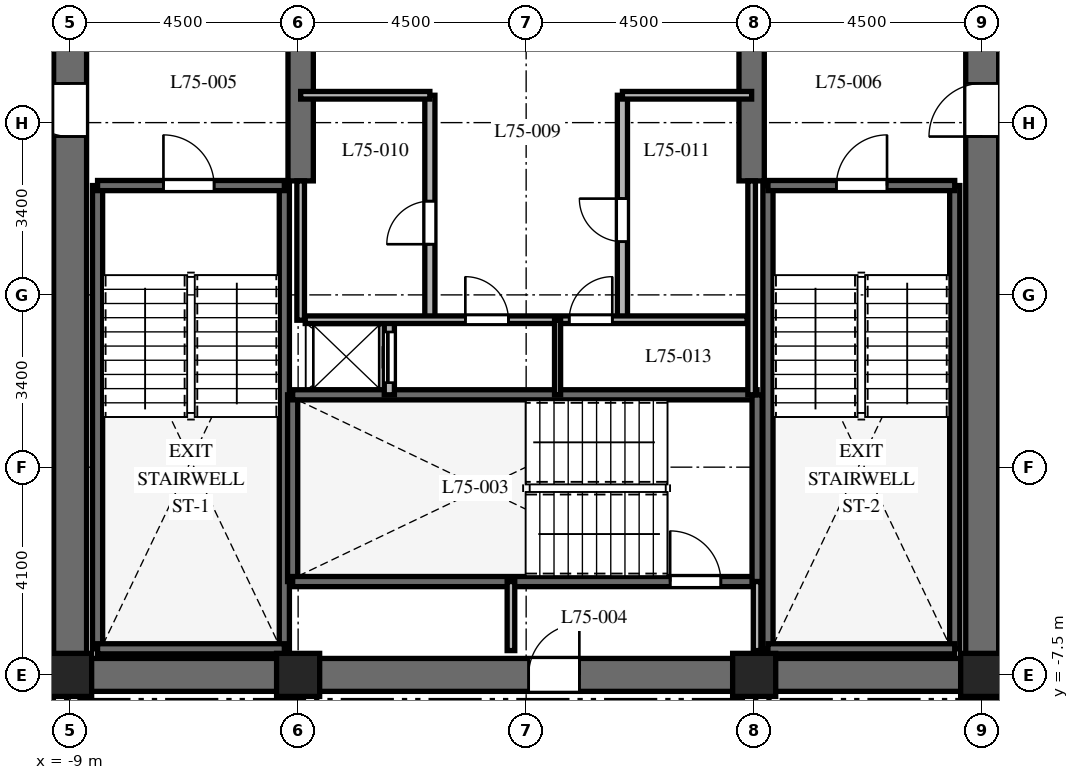
"""IFC4 building model, lengths in metres.
Left out: names, types, materials, properties, quantities, classifications, styles, units other than length and angle.
Written with IfcOpenShell. Run it as: python <this file> out.ifc"""

import sys

from ifc_helpers import new_model, si_unit, direction, frame, frame_2d, origin, origin_2d, place, context, subcontext, project, spatial, rectangle, extrude, element, fill, save


model = new_model("IFC4")
c1 = context("Model", 3, precision=1e-05, world=origin(), true_north=direction((0.0, 1.0)))
c2 = subcontext(c1, "Body", "Model", "MODEL_VIEW")
j1 = project(units=[si_unit("LENGTHUNIT", "METRE"), si_unit("PLANEANGLEUNIT", "RADIAN")], contexts=[c1])
p1 = place(None, origin())
s1 = spatial("IfcSite", under=j1, at=p1, CompositionType="ELEMENT")
p2 = place(p1, origin())
s2 = spatial("IfcBuilding", under=s1, at=p2, CompositionType="ELEMENT")
p3 = place(p2, frame((0.0, 0.0, 301.5)))
s3 = spatial("IfcBuildingStorey", under=s2, at=p3, CompositionType="ELEMENT", Elevation=301.5)
p4 = place(p3, frame((-9.325, -7.5, 0.0), z_axis=(0.0, 0.0, 1.0), x_axis=(1.0, 0.0, 0.0)))
e1 = element("IfcWall", 1, at=p4, inside=s3, PredefinedType="SHEAR", context=c2, shape_type="SweptSolid", body=[
    extrude(rectangle(XDim=18.65, YDim=0.65, at=frame_2d((9.325, 0.0))), origin(), (0.0, 0.0, 1.0), 3.9),
])
p5 = place(p4, frame((9.375, 0.0, 0.0)))
e2 = element("IfcOpeningElement", 2, at=p5, cuts=e1, PredefinedType="OPENING", context=c2, shape_type="SweptSolid", body=[
    extrude(rectangle(XDim=1.0, YDim=2.15, at=frame_2d((0.5, 1.075))), frame((0.0, 0.335, 0.0), z_axis=(0.0, -1.0, 0.0), x_axis=(1.0, 0.0, 0.0)), (0.0, 0.0, 1.0), 0.67),
])
p6 = place(p3, frame((-9.0, -7.175, 0.0), z_axis=(0.0, 0.0, 1.0), x_axis=(0.0, 1.0, 0.0)))
e3 = element("IfcWall", 3, at=p6, inside=s3, PredefinedType="SHEAR", context=c2, shape_type="SweptSolid", body=[
    extrude(rectangle(XDim=14.35, YDim=0.65, at=frame_2d((7.175, 0.0))), origin(), (0.0, 0.0, 1.0), 3.9),
])
p7 = place(p6, frame((10.3, 0.0, 0.0)))
e4 = element("IfcOpeningElement", 4, at=p7, cuts=e3, PredefinedType="OPENING", context=c2, shape_type="SweptSolid", body=[
    extrude(rectangle(XDim=1.05, YDim=2.15, at=frame_2d((0.525, 1.075))), frame((0.0, 0.335, 0.0), z_axis=(0.0, -1.0, 0.0), x_axis=(1.0, 0.0, 0.0)), (0.0, 0.0, 1.0), 0.67),
])
p8 = place(p3, frame((9.0, -7.175, 0.0), z_axis=(0.0, 0.0, 1.0), x_axis=(0.0, 1.0, 0.0)))
e5 = element("IfcWall", 5, at=p8, inside=s3, PredefinedType="SHEAR", context=c2, shape_type="SweptSolid", body=[
    extrude(rectangle(XDim=14.35, YDim=0.65, at=frame_2d((7.175, 0.0))), origin(), (0.0, 0.0, 1.0), 3.9),
])
p9 = place(p8, frame((10.3, 0.0, 0.0)))
e6 = element("IfcOpeningElement", 6, at=p9, cuts=e5, PredefinedType="OPENING", context=c2, shape_type="SweptSolid", body=[
    extrude(rectangle(XDim=1.05, YDim=2.15, at=frame_2d((0.525, 1.075))), frame((0.0, 0.335, 0.0), z_axis=(0.0, -1.0, 0.0), x_axis=(1.0, 0.0, 0.0)), (0.0, 0.0, 1.0), 0.67),
])
for number, where, z_axis, x_axis in (
    (7, (-4.45, 2.25, 0.0), (0.0, 0.0, 1.0), (0.0, 1.0, 0.0)),
    (8, (4.45, 2.25, 0.0), (0.0, 0.0, 1.0), (0.0, 1.0, 0.0)),
):
    element("IfcWall", number, at=place(p3, frame(where, z_axis=z_axis, x_axis=x_axis)), inside=s3, PredefinedType="SHEAR", context=c2, shape_type="SweptSolid", body=[
        extrude(rectangle(XDim=4.925, YDim=0.5, at=frame_2d((2.462, 0.0))), origin(), (0.0, 0.0, 1.0), 3.9),
    ])
for number, where, z_axis, x_axis in (
    (9, (-8.458, -6.985, 0.0), (0.0, 0.0, 1.0), (0.0, 1.0, 0.0)),
    (10, (-4.772, -6.985, 0.0), (0.0, 0.0, 1.0), (0.0, 1.0, 0.0)),
):
    element("IfcWall", number, at=place(p3, frame(where, z_axis=z_axis, x_axis=x_axis)), inside=s3, PredefinedType="SHEAR", context=c2, shape_type="SweptSolid", body=[
        extrude(rectangle(XDim=9.143, YDim=0.2, at=frame_2d((4.572, 0.0))), origin(), (0.0, 0.0, 1.0), 3.9),
    ])
p10 = place(p3, frame((-8.458, -6.985, 0.0), z_axis=(0.0, 0.0, 1.0), x_axis=(1.0, 0.0, 0.0)))
e11 = element("IfcWall", 11, at=p10, inside=s3, PredefinedType="SHEAR", context=c2, shape_type="SweptSolid", body=[
    extrude(rectangle(XDim=3.686, YDim=0.2, at=frame_2d((1.843, 0.0))), origin(), (0.0, 0.0, 1.0), 3.9),
])
p11 = place(p3, frame((-8.458, 2.158, 0.0), z_axis=(0.0, 0.0, 1.0), x_axis=(1.0, 0.0, 0.0)))
e12 = element("IfcWall", 12, at=p11, inside=s3, PredefinedType="SHEAR", context=c2, shape_type="SweptSolid", body=[
    extrude(rectangle(XDim=3.686, YDim=0.2, at=frame_2d((1.843, 0.0))), origin(), (0.0, 0.0, 1.0), 3.9),
])
p12 = place(p11, frame((1.3, 0.0, 0.0)))
e13 = element("IfcOpeningElement", 13, at=p12, cuts=e12, PredefinedType="OPENING", context=c2, shape_type="SweptSolid", body=[
    extrude(rectangle(XDim=1.0, YDim=2.15, at=frame_2d((0.5, 1.075))), frame((0.0, 0.11, 0.0), z_axis=(0.0, -1.0, 0.0), x_axis=(1.0, 0.0, 0.0)), (0.0, 0.0, 1.0), 0.22),
])
for number, where, z_axis, x_axis in (
    (14, (4.772, -6.985, 0.0), (0.0, 0.0, 1.0), (0.0, 1.0, 0.0)),
    (15, (8.458, -6.985, 0.0), (0.0, 0.0, 1.0), (0.0, 1.0, 0.0)),
):
    element("IfcWall", number, at=place(p3, frame(where, z_axis=z_axis, x_axis=x_axis)), inside=s3, PredefinedType="SHEAR", context=c2, shape_type="SweptSolid", body=[
        extrude(rectangle(XDim=9.143, YDim=0.2, at=frame_2d((4.572, 0.0))), origin(), (0.0, 0.0, 1.0), 3.9),
    ])
p13 = place(p3, frame((4.772, -6.985, 0.0), z_axis=(0.0, 0.0, 1.0), x_axis=(1.0, 0.0, 0.0)))
e16 = element("IfcWall", 16, at=p13, inside=s3, PredefinedType="SHEAR", context=c2, shape_type="SweptSolid", body=[
    extrude(rectangle(XDim=3.686, YDim=0.2, at=frame_2d((1.843, 0.0))), origin(), (0.0, 0.0, 1.0), 3.9),
])
p14 = place(p3, frame((4.772, 2.158, 0.0), z_axis=(0.0, 0.0, 1.0), x_axis=(1.0, 0.0, 0.0)))
e17 = element("IfcWall", 17, at=p14, inside=s3, PredefinedType="SHEAR", context=c2, shape_type="SweptSolid", body=[
    extrude(rectangle(XDim=3.686, YDim=0.2, at=frame_2d((1.843, 0.0))), origin(), (0.0, 0.0, 1.0), 3.9),
])
p15 = place(p14, frame((1.35, 0.0, 0.0)))
e18 = element("IfcOpeningElement", 18, at=p15, cuts=e17, PredefinedType="OPENING", context=c2, shape_type="SweptSolid", body=[
    extrude(rectangle(XDim=1.0, YDim=2.15, at=frame_2d((0.5, 1.075))), frame((0.0, 0.11, 0.0), z_axis=(0.0, -1.0, 0.0), x_axis=(1.0, 0.0, 0.0)), (0.0, 0.0, 1.0), 0.22),
])
p16 = place(p3, frame((-4.608, -5.658, 0.0), z_axis=(0.0, 0.0, 1.0), x_axis=(0.0, 1.0, 0.0)))
e19 = element("IfcWall", 19, at=p16, inside=s3, PredefinedType="SHEAR", context=c2, shape_type="SweptSolid", body=[
    extrude(rectangle(XDim=3.686, YDim=0.2, at=frame_2d((1.843, 0.0))), origin(), (0.0, 0.0, 1.0), 3.9),
])
p17 = place(p3, frame((-4.608, -5.658, 0.0), z_axis=(0.0, 0.0, 1.0), x_axis=(1.0, 0.0, 0.0)))
e20 = element("IfcWall", 20, at=p17, inside=s3, PredefinedType="SHEAR", context=c2, shape_type="SweptSolid", body=[
    extrude(rectangle(XDim=9.166, YDim=0.2, at=frame_2d((4.583, 0.0))), origin(), (0.0, 0.0, 1.0), 3.9),
])
p18 = place(p17, frame((7.45, 0.0, 0.0)))
e21 = element("IfcOpeningElement", 21, at=p18, cuts=e20, PredefinedType="OPENING", context=c2, shape_type="SweptSolid", body=[
    extrude(rectangle(XDim=1.0, YDim=2.15, at=frame_2d((0.5, 1.075))), frame((0.0, 0.11, 0.0), z_axis=(0.0, -1.0, 0.0), x_axis=(1.0, 0.0, 0.0)), (0.0, 0.0, 1.0), 0.22),
])
p19 = place(p3, frame((-4.608, -1.972, 0.0), z_axis=(0.0, 0.0, 1.0), x_axis=(1.0, 0.0, 0.0)))
e22 = element("IfcWall", 22, at=p19, inside=s3, PredefinedType="SHEAR", context=c2, shape_type="SweptSolid", body=[
    extrude(rectangle(XDim=9.166, YDim=0.2, at=frame_2d((4.583, 0.0))), origin(), (0.0, 0.0, 1.0), 3.9),
])
p20 = place(p3, frame((4.558, -5.658, 0.0), z_axis=(0.0, 0.0, 1.0), x_axis=(0.0, 1.0, 0.0)))
e23 = element("IfcWall", 23, at=p20, inside=s3, PredefinedType="SHEAR", context=c2, shape_type="SweptSolid", body=[
    extrude(rectangle(XDim=3.686, YDim=0.2, at=frame_2d((1.843, 0.0))), origin(), (0.0, 0.0, 1.0), 3.9),
])
for number, where, z_axis, x_axis in (
    (24, (-9.0, -7.5, 0.0), (0.0, 0.0, 1.0), (1.0, 0.0, 0.0)),
    (25, (-4.5, -7.5, 0.0), (0.0, 0.0, 1.0), (1.0, 0.0, 0.0)),
    (26, (4.5, -7.5, 0.0), (0.0, 0.0, 1.0), (1.0, 0.0, 0.0)),
    (27, (9.0, -7.5, 0.0), (0.0, 0.0, 1.0), (1.0, 0.0, 0.0)),
):
    element("IfcColumn", number, at=place(p3, frame(where, z_axis=z_axis, x_axis=x_axis)), inside=s3, PredefinedType="COLUMN", context=c2, shape_type="SweptSolid", body=[
        extrude(rectangle(XDim=0.85, YDim=0.85, at=origin_2d()), origin(), (0.0, 0.0, 1.0), 3.9),
    ])
for number, where, z_axis, x_axis in (
    (28, (-0.3, -7.02, 0.0), (0.0, 0.0, 1.0), (0.0, 1.0, 0.0)),
    (29, (4.558, -7.02, 0.0), (0.0, 0.0, 1.0), (0.0, 1.0, 0.0)),
):
    element("IfcWall", number, at=place(p3, frame(where, z_axis=z_axis, x_axis=x_axis)), inside=s3, PredefinedType="PARTITIONING", context=c2, shape_type="SweptSolid", body=[
        extrude(rectangle(XDim=1.362, YDim=0.15, at=frame_2d((0.681, 0.0))), origin(), (0.0, 0.0, 1.0), 3.58),
    ])
p21 = place(p3, frame((-2.7, -1.972, 0.0), z_axis=(0.0, 0.0, 1.0), x_axis=(0.0, 1.0, 0.0)))
e30 = element("IfcWall", 30, at=p21, inside=s3, PredefinedType="PARTITIONING", context=c2, shape_type="SweptSolid", body=[
    extrude(rectangle(XDim=1.472, YDim=0.2, at=frame_2d((0.736, 0.0))), origin(), (0.0, 0.0, 1.0), 3.58),
])
p22 = place(p21, frame((0.24, 0.0, 0.0)))
e31 = element("IfcOpeningElement", 31, at=p22, cuts=e30, PredefinedType="OPENING", context=c2, shape_type="SweptSolid", body=[
    extrude(rectangle(XDim=1.0, YDim=2.2, at=frame_2d((0.5, 1.1))), frame((0.0, 0.11, 0.0), z_axis=(0.0, -1.0, 0.0), x_axis=(1.0, 0.0, 0.0)), (0.0, 0.0, 1.0), 0.22),
])
p23 = place(p3, frame((-4.45, -0.5, 0.0), z_axis=(0.0, 0.0, 1.0), x_axis=(0.0, 1.0, 0.0)))
e32 = element("IfcWall", 32, at=p23, inside=s3, PredefinedType="PARTITIONING", context=c2, shape_type="SweptSolid", body=[
    extrude(rectangle(XDim=2.75, YDim=0.15, at=frame_2d((1.375, 0.0))), origin(), (0.0, 0.0, 1.0), 3.58),
])
p24 = place(p3, frame((4.45, -1.972, 0.0), z_axis=(0.0, 0.0, 1.0), x_axis=(0.0, 1.0, 0.0)))
e33 = element("IfcWall", 33, at=p24, inside=s3, PredefinedType="PARTITIONING", context=c2, shape_type="SweptSolid", body=[
    extrude(rectangle(XDim=4.222, YDim=0.15, at=frame_2d((2.111, 0.0))), origin(), (0.0, 0.0, 1.0), 3.58),
])
p25 = place(p3, frame((-1.9, -0.5, 0.0), z_axis=(0.0, 0.0, 1.0), x_axis=(0.0, 1.0, 0.0)))
e34 = element("IfcWall", 34, at=p25, inside=s3, PredefinedType="PARTITIONING", context=c2, shape_type="SweptSolid", body=[
    extrude(rectangle(XDim=4.44, YDim=0.2, at=frame_2d((2.22, 0.0))), origin(), (0.0, 0.0, 1.0), 3.58),
])
p26 = place(p25, frame((1.5, 0.0, 0.0)))
e35 = element("IfcOpeningElement", 35, at=p26, cuts=e34, PredefinedType="OPENING", context=c2, shape_type="SweptSolid", body=[
    extrude(rectangle(XDim=0.85, YDim=2.03, at=frame_2d((0.425, 1.015))), frame((0.0, 0.11, 0.0), z_axis=(0.0, -1.0, 0.0), x_axis=(1.0, 0.0, 0.0)), (0.0, 0.0, 1.0), 0.22),
])
p27 = place(p3, frame((-4.45, 3.94, 0.0), z_axis=(0.0, 0.0, 1.0), x_axis=(1.0, 0.0, 0.0)))
e36 = element("IfcWall", 36, at=p27, inside=s3, PredefinedType="PARTITIONING", context=c2, shape_type="SweptSolid", body=[
    extrude(rectangle(XDim=2.55, YDim=0.15, at=frame_2d((1.275, 0.0))), origin(), (0.0, 0.0, 1.0), 3.58),
])
p28 = place(p3, frame((1.9, -0.5, 0.0), z_axis=(0.0, 0.0, 1.0), x_axis=(0.0, 1.0, 0.0)))
e37 = element("IfcWall", 37, at=p28, inside=s3, PredefinedType="PARTITIONING", context=c2, shape_type="SweptSolid", body=[
    extrude(rectangle(XDim=4.44, YDim=0.2, at=frame_2d((2.22, 0.0))), origin(), (0.0, 0.0, 1.0), 3.58),
])
p29 = place(p28, frame((1.55, 0.0, 0.0)))
e38 = element("IfcOpeningElement", 38, at=p29, cuts=e37, PredefinedType="OPENING", context=c2, shape_type="SweptSolid", body=[
    extrude(rectangle(XDim=0.85, YDim=2.03, at=frame_2d((0.425, 1.015))), frame((0.0, 0.11, 0.0), z_axis=(0.0, -1.0, 0.0), x_axis=(1.0, 0.0, 0.0)), (0.0, 0.0, 1.0), 0.22),
])
p30 = place(p3, frame((1.9, 3.94, 0.0), z_axis=(0.0, 0.0, 1.0), x_axis=(1.0, 0.0, 0.0)))
e39 = element("IfcWall", 39, at=p30, inside=s3, PredefinedType="PARTITIONING", context=c2, shape_type="SweptSolid", body=[
    extrude(rectangle(XDim=2.55, YDim=0.15, at=frame_2d((1.275, 0.0))), origin(), (0.0, 0.0, 1.0), 3.58),
])
p31 = place(p3, frame((-4.36, -0.49, 0.0), z_axis=(0.0, 0.0, 1.0), x_axis=(1.0, 0.0, 0.0)))
e40 = element("IfcWall", 40, at=p31, inside=s3, PredefinedType="PARTITIONING", context=c2, shape_type="SweptSolid", body=[
    extrude(rectangle(XDim=8.72, YDim=0.15, at=frame_2d((4.36, 0.0))), origin(), (0.0, 0.0, 1.0), 3.58),
])
p32 = place(p31, frame((3.16, 0.0, 0.0)))
e41 = element("IfcOpeningElement", 41, at=p32, cuts=e40, PredefinedType="OPENING", context=c2, shape_type="SweptSolid", body=[
    extrude(rectangle(XDim=0.85, YDim=2.03, at=frame_2d((0.425, 1.015))), frame((0.0, 0.085, 0.0), z_axis=(0.0, -1.0, 0.0), x_axis=(1.0, 0.0, 0.0)), (0.0, 0.0, 1.0), 0.17),
])
p33 = place(p31, frame((5.21, 0.0, 0.0)))
e42 = element("IfcOpeningElement", 42, at=p33, cuts=e40, PredefinedType="OPENING", context=c2, shape_type="SweptSolid", body=[
    extrude(rectangle(XDim=0.85, YDim=2.03, at=frame_2d((0.425, 1.015))), frame((0.0, 0.085, 0.0), z_axis=(0.0, -1.0, 0.0), x_axis=(1.0, 0.0, 0.0)), (0.0, 0.0, 1.0), 0.17),
])
p34 = place(p3, frame((0.62, -1.972, 0.0), z_axis=(0.0, 0.0, 1.0), x_axis=(0.0, 1.0, 0.0)))
e43 = element("IfcWall", 43, at=p34, inside=s3, PredefinedType="PARTITIONING", context=c2, shape_type="SweptSolid", body=[
    extrude(rectangle(XDim=1.472, YDim=0.12, at=frame_2d((0.736, 0.0))), origin(), (0.0, 0.0, 1.0), 3.58),
])
p35 = place(p12, origin())
e44 = element("IfcDoor", 44, at=p35, inside=s3, OperationType="SINGLE_SWING_LEFT", PredefinedType="DOOR", context=c2, shape_type="SweptSolid", body=[
    extrude(rectangle(XDim=1.0, YDim=2.15, at=frame_2d((0.5, 1.075))), frame((0.0, 0.025, 0.0), z_axis=(0.0, -1.0, 0.0), x_axis=(1.0, 0.0, 0.0)), (0.0, 0.0, 1.0), 0.05),
])
fill(e13, e44)
p36 = place(p15, origin())
e45 = element("IfcDoor", 45, at=p36, inside=s3, OperationType="SINGLE_SWING_RIGHT", PredefinedType="DOOR", context=c2, shape_type="SweptSolid", body=[
    extrude(rectangle(XDim=1.0, YDim=2.15, at=frame_2d((0.5, 1.075))), frame((0.0, 0.025, 0.0), z_axis=(0.0, -1.0, 0.0), x_axis=(1.0, 0.0, 0.0)), (0.0, 0.0, 1.0), 0.05),
])
fill(e18, e45)
p37 = place(p18, origin())
e46 = element("IfcDoor", 46, at=p37, inside=s3, OperationType="SINGLE_SWING_LEFT", PredefinedType="DOOR", context=c2, shape_type="SweptSolid", body=[
    extrude(rectangle(XDim=1.0, YDim=2.15, at=frame_2d((0.5, 1.075))), frame((0.0, 0.025, 0.0), z_axis=(0.0, -1.0, 0.0), x_axis=(1.0, 0.0, 0.0)), (0.0, 0.0, 1.0), 0.05),
])
fill(e21, e46)
p38 = place(p5, origin())
e47 = element("IfcDoor", 47, at=p38, inside=s3, OperationType="SINGLE_SWING_RIGHT", PredefinedType="DOOR", context=c2, shape_type="SweptSolid", body=[
    extrude(rectangle(XDim=1.0, YDim=2.15, at=frame_2d((0.5, 1.075))), frame((0.0, 0.025, 0.0), z_axis=(0.0, -1.0, 0.0), x_axis=(1.0, 0.0, 0.0)), (0.0, 0.0, 1.0), 0.05),
])
fill(e2, e47)
p39 = place(p7, origin())
e48 = element("IfcDoor", 48, at=p39, inside=s3, OperationType="SINGLE_SWING_RIGHT", PredefinedType="DOOR", context=c2, shape_type="SweptSolid", body=[
    extrude(rectangle(XDim=1.05, YDim=2.15, at=frame_2d((0.525, 1.075))), frame((0.0, 0.025, 0.0), z_axis=(0.0, -1.0, 0.0), x_axis=(1.0, 0.0, 0.0)), (0.0, 0.0, 1.0), 0.05),
])
fill(e4, e48)
p40 = place(p9, origin())
e49 = element("IfcDoor", 49, at=p40, inside=s3, OperationType="SINGLE_SWING_LEFT", PredefinedType="DOOR", context=c2, shape_type="SweptSolid", body=[
    extrude(rectangle(XDim=1.05, YDim=2.15, at=frame_2d((0.525, 1.075))), frame((0.0, 0.025, 0.0), z_axis=(0.0, -1.0, 0.0), x_axis=(1.0, 0.0, 0.0)), (0.0, 0.0, 1.0), 0.05),
])
fill(e6, e49)
p41 = place(p22, origin())
e50 = element("IfcDoor", 50, at=p41, inside=s3, OperationType="SLIDING_TO_LEFT", PredefinedType="DOOR", context=c2, shape_type="SweptSolid", body=[
    extrude(rectangle(XDim=1.0, YDim=2.2, at=frame_2d((0.5, 1.1))), frame((0.0, 0.025, 0.0), z_axis=(0.0, -1.0, 0.0), x_axis=(1.0, 0.0, 0.0)), (0.0, 0.0, 1.0), 0.05),
])
fill(e31, e50)
p42 = place(p26, origin())
e51 = element("IfcDoor", 51, at=p42, inside=s3, OperationType="SINGLE_SWING_LEFT", PredefinedType="DOOR", context=c2, shape_type="SweptSolid", body=[
    extrude(rectangle(XDim=0.85, YDim=2.03, at=frame_2d((0.425, 1.015))), frame((0.0, 0.025, 0.0), z_axis=(0.0, -1.0, 0.0), x_axis=(1.0, 0.0, 0.0)), (0.0, 0.0, 1.0), 0.05),
])
fill(e35, e51)
p43 = place(p29, origin())
e52 = element("IfcDoor", 52, at=p43, inside=s3, OperationType="SINGLE_SWING_RIGHT", PredefinedType="DOOR", context=c2, shape_type="SweptSolid", body=[
    extrude(rectangle(XDim=0.85, YDim=2.03, at=frame_2d((0.425, 1.015))), frame((0.0, 0.025, 0.0), z_axis=(0.0, -1.0, 0.0), x_axis=(1.0, 0.0, 0.0)), (0.0, 0.0, 1.0), 0.05),
])
fill(e38, e52)
p44 = place(p32, origin())
e53 = element("IfcDoor", 53, at=p44, inside=s3, OperationType="SINGLE_SWING_LEFT", PredefinedType="DOOR", context=c2, shape_type="SweptSolid", body=[
    extrude(rectangle(XDim=0.85, YDim=2.03, at=frame_2d((0.425, 1.015))), frame((0.0, 0.025, 0.0), z_axis=(0.0, -1.0, 0.0), x_axis=(1.0, 0.0, 0.0)), (0.0, 0.0, 1.0), 0.05),
])
fill(e41, e53)
p45 = place(p33, origin())
e54 = element("IfcDoor", 54, at=p45, inside=s3, OperationType="SINGLE_SWING_RIGHT", PredefinedType="DOOR", context=c2, shape_type="SweptSolid", body=[
    extrude(rectangle(XDim=0.85, YDim=2.03, at=frame_2d((0.425, 1.015))), frame((0.0, 0.025, 0.0), z_axis=(0.0, -1.0, 0.0), x_axis=(1.0, 0.0, 0.0)), (0.0, 0.0, 1.0), 0.05),
])
fill(e42, e54)
save(model, sys.argv[1])
